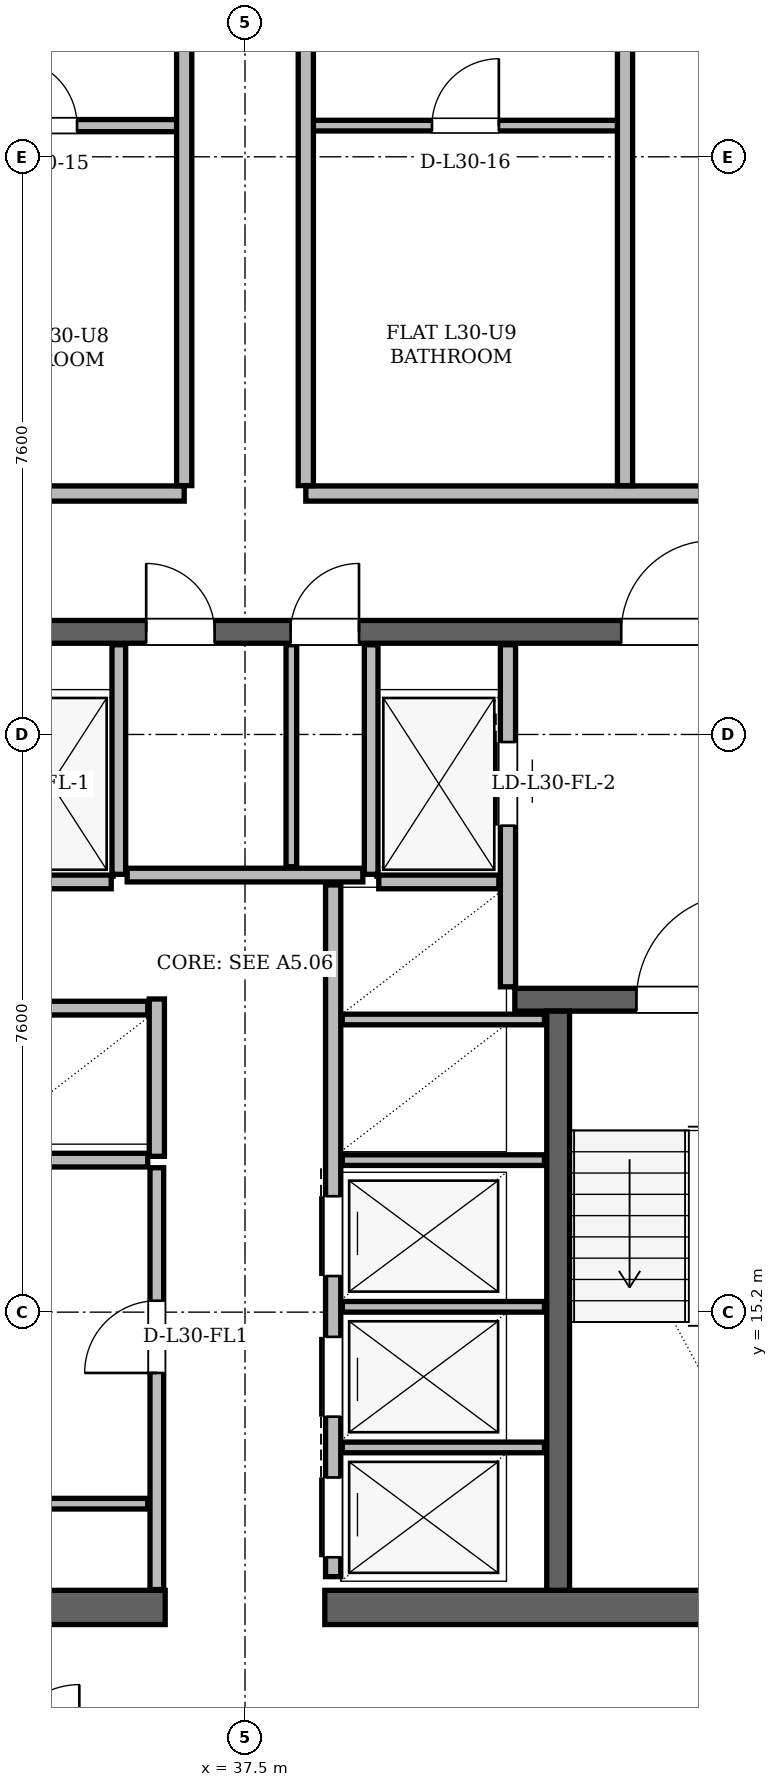
"""IFC4 building model, lengths in metres.
Left out: names, types, materials, properties, quantities, classifications, styles, units other than length and angle.
Written with IfcOpenShell. Run it as: python <this file> out.ifc"""

import sys

from ifc_helpers import new_model, si_unit, direction, frame, frame_2d, origin, place, context, subcontext, project, spatial, rectangle, extrude, element, fill, save


model = new_model("IFC4")
c1 = context("Model", 3, precision=1e-05, world=origin(), true_north=direction((0.0, 1.0)))
c2 = subcontext(c1, "Body", "Model", "MODEL_VIEW")
j1 = project(units=[si_unit("LENGTHUNIT", "METRE"), si_unit("PLANEANGLEUNIT", "RADIAN")], contexts=[c1])
p1 = place(None, origin())
s1 = spatial("IfcSite", under=j1, at=p1, CompositionType="ELEMENT")
p2 = place(p1, origin())
s2 = spatial("IfcBuilding", under=s1, at=p2, CompositionType="ELEMENT")
p3 = place(p2, frame((0.0, 0.0, 115.8)))
s3 = spatial("IfcBuildingStorey", under=s2, at=p3, CompositionType="ELEMENT", Elevation=115.8)
for number, where, z_axis, x_axis in (
    (1, (29.35, 11.315, 0.0), (0.0, 0.0, 1.0), (1.0, 0.0, 0.0)),
    (2, (38.55, 11.315, 0.0), (0.0, 0.0, 1.0), (1.0, 0.0, 0.0)),
):
    element("IfcWall", number, at=place(p3, frame(where, z_axis=z_axis, x_axis=x_axis)), inside=s3, PredefinedType="SHEAR", context=c2, shape_type="SweptSolid", body=[
        extrude(rectangle(XDim=7.1, YDim=0.45, at=frame_2d((3.55, 0.0))), origin(), (0.0, 0.0, 1.0), 3.36),
    ])
p4 = place(p3, frame((29.65, 24.15, 0.0), z_axis=(0.0, 0.0, 1.0), x_axis=(1.0, 0.0, 0.0)))
e3 = element("IfcWall", 3, at=p4, inside=s3, PredefinedType="SHEAR", context=c2, shape_type="SweptSolid", body=[
    extrude(rectangle(XDim=15.7, YDim=0.3, at=frame_2d((7.85, 0.0))), origin(), (0.0, 0.0, 1.0), 3.36),
])
p5 = place(p4, frame((1.7, 0.0, 0.0)))
e4 = element("IfcOpeningElement", 4, at=p5, cuts=e3, PredefinedType="OPENING", context=c2, shape_type="SweptSolid", body=[
    extrude(rectangle(XDim=1.2, YDim=2.2, at=frame_2d((0.6, 1.1))), frame((0.0, 0.15, 0.0), z_axis=(0.0, -1.0, 0.0), x_axis=(1.0, 0.0, 0.0)), (0.0, 0.0, 1.0), 0.3),
])
p6 = place(p4, frame((12.8, 0.0, 0.0)))
e5 = element("IfcOpeningElement", 5, at=p6, cuts=e3, PredefinedType="OPENING", context=c2, shape_type="SweptSolid", body=[
    extrude(rectangle(XDim=1.2, YDim=2.2, at=frame_2d((0.6, 1.1))), frame((0.0, 0.15, 0.0), z_axis=(0.0, -1.0, 0.0), x_axis=(1.0, 0.0, 0.0)), (0.0, 0.0, 1.0), 0.3),
])
p7 = place(p4, frame((6.55, 0.0, 0.0)))
e6 = element("IfcOpeningElement", 6, at=p7, cuts=e3, PredefinedType="OPENING", context=c2, shape_type="SweptSolid", body=[
    extrude(rectangle(XDim=0.9, YDim=2.05, at=frame_2d((0.45, 1.025))), frame((0.0, 0.15, 0.0), z_axis=(0.0, -1.0, 0.0), x_axis=(1.0, 0.0, 0.0)), (0.0, 0.0, 1.0), 0.3),
])
p8 = place(p4, frame((8.45, 0.0, 0.0)))
e7 = element("IfcOpeningElement", 7, at=p8, cuts=e3, PredefinedType="OPENING", context=c2, shape_type="SweptSolid", body=[
    extrude(rectangle(XDim=0.9, YDim=2.05, at=frame_2d((0.45, 1.025))), frame((0.0, 0.15, 0.0), z_axis=(0.0, -1.0, 0.0), x_axis=(1.0, 0.0, 0.0)), (0.0, 0.0, 1.0), 0.3),
])
p9 = place(p3, frame((41.05, 19.31, 0.0), z_axis=(0.0, 0.0, 1.0), x_axis=(1.0, 0.0, 0.0)))
e8 = element("IfcWall", 8, at=p9, inside=s3, PredefinedType="SHEAR", context=c2, shape_type="SweptSolid", body=[
    extrude(rectangle(XDim=4.01, YDim=0.3, at=frame_2d((2.005, 0.0))), origin(), (0.0, 0.0, 1.0), 3.36),
])
p10 = place(p9, frame((1.6, 0.0, 0.0)))
e9 = element("IfcOpeningElement", 9, at=p10, cuts=e8, PredefinedType="OPENING", context=c2, shape_type="SweptSolid", body=[
    extrude(rectangle(XDim=1.4, YDim=2.2, at=frame_2d((0.7, 1.1))), frame((0.0, 0.15, 0.0), z_axis=(0.0, -1.0, 0.0), x_axis=(1.0, 0.0, 0.0)), (0.0, 0.0, 1.0), 0.3),
])
p11 = place(p3, frame((41.62, 11.54, 0.0), z_axis=(0.0, 0.0, 1.0), x_axis=(0.0, 1.0, 0.0)))
e10 = element("IfcWall", 10, at=p11, inside=s3, PredefinedType="SHEAR", context=c2, shape_type="SweptSolid", body=[
    extrude(rectangle(XDim=7.62, YDim=0.3, at=frame_2d((3.81, 0.0))), origin(), (0.0, 0.0, 1.0), 3.36),
])
p12 = place(p3, frame((50.789, 30.024, 0.0), z_axis=(0.0, 0.0, 1.0), x_axis=(-0.499997162583, 0.866027041962, 0.0)))
e11 = element("IfcWall", 11, at=p12, inside=s3, PredefinedType="SOLIDWALL", context=c2, shape_type="SweptSolid", body=[
    extrude(rectangle(XDim=15.463, YDim=0.34, at=frame_2d((7.731, 0.0))), origin(), (0.0, 0.0, 1.0), 2.578),
])
p13 = place(p12, frame((10.744, 0.0, 0.0)))
e12 = element("IfcOpeningElement", 12, at=p13, cuts=e11, PredefinedType="OPENING", context=c2, shape_type="SweptSolid", body=[
    extrude(rectangle(XDim=1.5, YDim=2.2, at=frame_2d((0.75, 1.1))), frame((0.0, 0.17, 0.0), z_axis=(0.0, -1.0, 0.0), x_axis=(1.0, 0.0, 0.0)), (0.0, 0.0, 1.0), 0.34),
])
p14 = place(p12, frame((1.306, 0.0, 0.85)))
e13 = element("IfcOpeningElement", 13, at=p14, cuts=e11, PredefinedType="OPENING", context=c2, shape_type="SweptSolid", body=[
    extrude(rectangle(XDim=2.5, YDim=1.618, at=frame_2d((1.25, 0.809))), frame((0.0, 0.17, 0.0), z_axis=(0.0, -1.0, 0.0), x_axis=(1.0, 0.0, 0.0)), (0.0, 0.0, 1.0), 0.34),
])
p15 = place(p12, frame((5.665, 0.0, 0.85)))
e14 = element("IfcOpeningElement", 14, at=p15, cuts=e11, PredefinedType="OPENING", context=c2, shape_type="SweptSolid", body=[
    extrude(rectangle(XDim=1.2, YDim=1.48, at=frame_2d((0.6, 0.74))), frame((0.0, 0.17, 0.0), z_axis=(0.0, -1.0, 0.0), x_axis=(1.0, 0.0, 0.0)), (0.0, 0.0, 1.0), 0.34),
])
p16 = place(p12, frame((13.231, 0.0, 0.85)))
e15 = element("IfcOpeningElement", 15, at=p16, cuts=e11, PredefinedType="OPENING", context=c2, shape_type="SweptSolid", body=[
    extrude(rectangle(XDim=1.2, YDim=1.48, at=frame_2d((0.6, 0.74))), frame((0.0, 0.17, 0.0), z_axis=(0.0, -1.0, 0.0), x_axis=(1.0, 0.0, 0.0)), (0.0, 0.0, 1.0), 0.34),
])
p17 = place(p3, frame((35.84, 20.96, 0.0), z_axis=(0.0, 0.0, 1.0), x_axis=(0.0, 1.0, 0.0)))
e16 = element("IfcWall", 16, at=p17, inside=s3, PredefinedType="PARTITIONING", context=c2, shape_type="SweptSolid", body=[
    extrude(rectangle(XDim=3.02, YDim=0.18, at=frame_2d((1.51, 0.0))), origin(), (0.0, 0.0, 1.0), 2.4),
])
p18 = place(p3, frame((34.16, 20.86, 0.0), z_axis=(0.0, 0.0, 1.0), x_axis=(1.0, 0.0, 0.0)))
e17 = element("IfcWall", 17, at=p18, inside=s3, PredefinedType="PARTITIONING", context=c2, shape_type="SweptSolid", body=[
    extrude(rectangle(XDim=1.58, YDim=0.18, at=frame_2d((0.79, 0.0))), origin(), (0.0, 0.0, 1.0), 3.36),
])
p19 = place(p3, frame((40.96, 19.48, 0.0), z_axis=(0.0, 0.0, 1.0), x_axis=(0.0, 1.0, 0.0)))
e18 = element("IfcWall", 18, at=p19, inside=s3, PredefinedType="PARTITIONING", context=c2, shape_type="SweptSolid", body=[
    extrude(rectangle(XDim=4.5, YDim=0.2, at=frame_2d((2.25, 0.0))), origin(), (0.0, 0.0, 1.0), 2.4),
])
p20 = place(p19, frame((2.12, 0.0, 0.0)))
e19 = element("IfcOpeningElement", 19, at=p20, cuts=e18, PredefinedType="OPENING", context=c2, shape_type="SweptSolid", body=[
    extrude(rectangle(XDim=1.1, YDim=2.2, at=frame_2d((0.55, 1.1))), frame((0.0, 0.1, 0.0), z_axis=(0.0, -1.0, 0.0), x_axis=(1.0, 0.0, 0.0)), (0.0, 0.0, 1.0), 0.2),
])
p21 = place(p3, frame((39.16, 20.96, 0.0), z_axis=(0.0, 0.0, 1.0), x_axis=(0.0, 1.0, 0.0)))
e20 = element("IfcWall", 20, at=p21, inside=s3, PredefinedType="PARTITIONING", context=c2, shape_type="SweptSolid", body=[
    extrude(rectangle(XDim=3.02, YDim=0.18, at=frame_2d((1.51, 0.0))), origin(), (0.0, 0.0, 1.0), 2.4),
])
p22 = place(p3, frame((39.26, 20.86, 0.0), z_axis=(0.0, 0.0, 1.0), x_axis=(1.0, 0.0, 0.0)))
e21 = element("IfcWall", 21, at=p22, inside=s3, PredefinedType="PARTITIONING", context=c2, shape_type="SweptSolid", body=[
    extrude(rectangle(XDim=1.58, YDim=0.18, at=frame_2d((0.79, 0.0))), origin(), (0.0, 0.0, 1.0), 3.36),
])
p23 = place(p3, frame((36.34, 17.25, 0.0), z_axis=(0.0, 0.0, 1.0), x_axis=(0.0, 1.0, 0.0)))
e22 = element("IfcWall", 22, at=p23, inside=s3, PredefinedType="PARTITIONING", context=c2, shape_type="SweptSolid", body=[
    extrude(rectangle(XDim=2.07, YDim=0.2, at=frame_2d((1.035, 0.0))), origin(), (0.0, 0.0, 1.0), 3.36),
])
p24 = place(p3, frame((33.95, 19.2, 0.0), z_axis=(0.0, 0.0, 1.0), x_axis=(1.0, 0.0, 0.0)))
e23 = element("IfcWall", 23, at=p24, inside=s3, PredefinedType="PARTITIONING", context=c2, shape_type="SweptSolid", body=[
    extrude(rectangle(XDim=2.27, YDim=0.18, at=frame_2d((1.135, 0.0))), origin(), (0.0, 0.0, 1.0), 3.36),
])
p25 = place(p3, frame((33.56, 17.2, 0.0), z_axis=(0.0, 0.0, 1.0), x_axis=(1.0, 0.0, 0.0)))
e24 = element("IfcWall", 24, at=p25, inside=s3, PredefinedType="PARTITIONING", context=c2, shape_type="SweptSolid", body=[
    extrude(rectangle(XDim=2.66, YDim=0.18, at=frame_2d((1.33, 0.0))), origin(), (0.0, 0.0, 1.0), 3.36),
])
p26 = place(p3, frame((36.34, 11.55, 0.0), z_axis=(0.0, 0.0, 1.0), x_axis=(0.0, 1.0, 0.0)))
e25 = element("IfcWall", 25, at=p26, inside=s3, PredefinedType="PARTITIONING", context=c2, shape_type="SweptSolid", body=[
    extrude(rectangle(XDim=5.55, YDim=0.18, at=frame_2d((2.775, 0.0))), origin(), (0.0, 0.0, 1.0), 3.36),
])
p27 = place(p26, frame((2.85, 0.0, 0.0)))
e26 = element("IfcOpeningElement", 26, at=p27, cuts=e25, PredefinedType="OPENING", context=c2, shape_type="SweptSolid", body=[
    extrude(rectangle(XDim=0.95, YDim=2.1, at=frame_2d((0.475, 1.05))), frame((0.0, 0.09, 0.0), z_axis=(0.0, -1.0, 0.0), x_axis=(1.0, 0.0, 0.0)), (0.0, 0.0, 1.0), 0.18),
])
p28 = place(p3, frame((33.56, 12.68, 0.0), z_axis=(0.0, 0.0, 1.0), x_axis=(1.0, 0.0, 0.0)))
e27 = element("IfcWall", 27, at=p28, inside=s3, PredefinedType="PARTITIONING", context=c2, shape_type="SweptSolid", body=[
    extrude(rectangle(XDim=2.66, YDim=0.14, at=frame_2d((1.33, 0.0))), origin(), (0.0, 0.0, 1.0), 3.36),
])
p29 = place(p3, frame((38.66, 11.72, 0.0), z_axis=(0.0, 0.0, 1.0), x_axis=(0.0, 1.0, 0.0)))
e28 = element("IfcWall", 28, at=p29, inside=s3, PredefinedType="PARTITIONING", context=c2, shape_type="SweptSolid", body=[
    extrude(rectangle(XDim=9.1, YDim=0.2, at=frame_2d((4.55, 0.0))), origin(), (0.0, 0.0, 1.0), 3.36),
])
p30 = place(p29, frame((0.255, 0.0, 0.0)))
e29 = element("IfcOpeningElement", 29, at=p30, cuts=e28, PredefinedType="OPENING", context=c2, shape_type="SweptSolid", body=[
    extrude(rectangle(XDim=1.05, YDim=2.15, at=frame_2d((0.525, 1.075))), frame((0.0, 0.1, 0.0), z_axis=(0.0, -1.0, 0.0), x_axis=(1.0, 0.0, 0.0)), (0.0, 0.0, 1.0), 0.2),
])
p31 = place(p29, frame((2.105, 0.0, 0.0)))
e30 = element("IfcOpeningElement", 30, at=p31, cuts=e28, PredefinedType="OPENING", context=c2, shape_type="SweptSolid", body=[
    extrude(rectangle(XDim=1.05, YDim=2.15, at=frame_2d((0.525, 1.075))), frame((0.0, 0.1, 0.0), z_axis=(0.0, -1.0, 0.0), x_axis=(1.0, 0.0, 0.0)), (0.0, 0.0, 1.0), 0.2),
])
p32 = place(p29, frame((3.955, 0.0, 0.0)))
e31 = element("IfcOpeningElement", 31, at=p32, cuts=e28, PredefinedType="OPENING", context=c2, shape_type="SweptSolid", body=[
    extrude(rectangle(XDim=1.05, YDim=2.15, at=frame_2d((0.525, 1.075))), frame((0.0, 0.1, 0.0), z_axis=(0.0, -1.0, 0.0), x_axis=(1.0, 0.0, 0.0)), (0.0, 0.0, 1.0), 0.2),
])
for number, where, z_axis, x_axis in (
    (32, (38.78, 13.42, 0.0), (0.0, 0.0, 1.0), (1.0, 0.0, 0.0)),
    (33, (38.78, 15.27, 0.0), (0.0, 0.0, 1.0), (1.0, 0.0, 0.0)),
    (34, (38.78, 17.2, 0.0), (0.0, 0.0, 1.0), (1.0, 0.0, 0.0)),
    (35, (38.78, 19.05, 0.0), (0.0, 0.0, 1.0), (1.0, 0.0, 0.0)),
):
    element("IfcWall", number, at=place(p3, frame(where, z_axis=z_axis, x_axis=x_axis)), inside=s3, PredefinedType="PARTITIONING", context=c2, shape_type="SweptSolid", body=[
        extrude(rectangle(XDim=2.66, YDim=0.14, at=frame_2d((1.33, 0.0))), origin(), (0.0, 0.0, 1.0), 3.36),
    ])
p33 = place(p3, frame((35.95, 20.95, 0.0), z_axis=(0.0, 0.0, 1.0), x_axis=(1.0, 0.0, 0.0)))
e36 = element("IfcWall", 36, at=p33, inside=s3, PredefinedType="PARTITIONING", context=c2, shape_type="SweptSolid", body=[
    extrude(rectangle(XDim=3.1, YDim=0.18, at=frame_2d((1.55, 0.0))), origin(), (0.0, 0.0, 1.0), 3.36),
])
p34 = place(p3, frame((38.11, 21.06, 0.0), z_axis=(0.0, 0.0, 1.0), x_axis=(0.0, 1.0, 0.0)))
e37 = element("IfcWall", 37, at=p34, inside=s3, PredefinedType="PARTITIONING", context=c2, shape_type="SweptSolid", body=[
    extrude(rectangle(XDim=2.92, YDim=0.14, at=frame_2d((1.46, 0.0))), origin(), (0.0, 0.0, 1.0), 2.4),
])
p35 = place(p3, frame((27.55, 25.97, 0.0), z_axis=(0.0, 0.0, 1.0), x_axis=(1.0, 0.0, 0.0)))
e38 = element("IfcWall", 38, at=p35, inside=s3, PredefinedType="PARTITIONING", context=c2, shape_type="SweptSolid", body=[
    extrude(rectangle(XDim=9.15, YDim=0.2, at=frame_2d((4.575, 0.0))), origin(), (0.0, 0.0, 1.0), 2.814),
])
p36 = place(p35, frame((2.173, 0.0, 0.0)))
e39 = element("IfcOpeningElement", 39, at=p36, cuts=e38, PredefinedType="OPENING", context=c2, shape_type="SweptSolid", body=[
    extrude(rectangle(XDim=1.0, YDim=2.18, at=frame_2d((0.5, 1.09))), frame((0.0, 0.1, 0.0), z_axis=(0.0, -1.0, 0.0), x_axis=(1.0, 0.0, 0.0)), (0.0, 0.0, 1.0), 0.2),
])
p37 = place(p3, frame((38.3, 25.97, 0.0), z_axis=(0.0, 0.0, 1.0), x_axis=(1.0, 0.0, 0.0)))
e40 = element("IfcWall", 40, at=p37, inside=s3, PredefinedType="PARTITIONING", context=c2, shape_type="SweptSolid", body=[
    extrude(rectangle(XDim=11.7, YDim=0.2, at=frame_2d((5.85, 0.0))), origin(), (0.0, 0.0, 1.0), 2.814),
])
p38 = place(p37, frame((7.727, 0.0, 0.0)))
e41 = element("IfcOpeningElement", 41, at=p38, cuts=e40, PredefinedType="OPENING", context=c2, shape_type="SweptSolid", body=[
    extrude(rectangle(XDim=1.0, YDim=2.18, at=frame_2d((0.5, 1.09))), frame((0.0, 0.1, 0.0), z_axis=(0.0, -1.0, 0.0), x_axis=(1.0, 0.0, 0.0)), (0.0, 0.0, 1.0), 0.2),
])
p39 = place(p3, frame((32.918, 30.81, 0.0), z_axis=(0.0, 0.0, 1.0), x_axis=(1.0, 0.0, 0.0)))
e42 = element("IfcWall", 42, at=p39, inside=s3, PredefinedType="PARTITIONING", context=c2, shape_type="SweptSolid", body=[
    extrude(rectangle(XDim=3.864, YDim=0.16, at=frame_2d((1.932, 0.0))), origin(), (0.0, 0.0, 1.0), 3.36),
])
p40 = place(p39, frame((1.492, 0.0, 0.0)))
e43 = element("IfcOpeningElement", 43, at=p40, cuts=e42, PredefinedType="OPENING", context=c2, shape_type="SweptSolid", body=[
    extrude(rectangle(XDim=0.88, YDim=2.08, at=frame_2d((0.44, 1.04))), frame((0.0, 0.08, 0.0), z_axis=(0.0, -1.0, 0.0), x_axis=(1.0, 0.0, 0.0)), (0.0, 0.0, 1.0), 0.16),
])
p41 = place(p3, frame((38.218, 30.81, 0.0), z_axis=(0.0, 0.0, 1.0), x_axis=(1.0, 0.0, 0.0)))
e44 = element("IfcWall", 44, at=p41, inside=s3, PredefinedType="PARTITIONING", context=c2, shape_type="SweptSolid", body=[
    extrude(rectangle(XDim=4.364, YDim=0.14, at=frame_2d((2.182, 0.0))), origin(), (0.0, 0.0, 1.0), 3.36),
])
p42 = place(p41, frame((1.742, 0.0, 0.0)))
e45 = element("IfcOpeningElement", 45, at=p42, cuts=e44, PredefinedType="OPENING", context=c2, shape_type="SweptSolid", body=[
    extrude(rectangle(XDim=0.88, YDim=2.08, at=frame_2d((0.44, 1.04))), frame((0.0, 0.07, 0.0), z_axis=(0.0, -1.0, 0.0), x_axis=(1.0, 0.0, 0.0)), (0.0, 0.0, 1.0), 0.14),
])
p43 = place(p3, frame((36.7, 26.074, 0.0), z_axis=(0.0, 0.0, 1.0), x_axis=(0.0, 1.0, 0.0)))
e46 = element("IfcWall", 46, at=p43, inside=s3, PredefinedType="PARTITIONING", context=c2, shape_type="SweptSolid", body=[
    extrude(rectangle(XDim=17.168, YDim=0.2, at=frame_2d((8.584, 0.0))), origin(), (0.0, 0.0, 1.0), 3.36),
])
p44 = place(p43, frame((8.537, 0.0, 0.0)))
e47 = element("IfcOpeningElement", 47, at=p44, cuts=e46, PredefinedType="OPENING", context=c2, shape_type="SweptSolid", body=[
    extrude(rectangle(XDim=1.0, YDim=2.18, at=frame_2d((0.5, 1.09))), frame((0.0, 0.1, 0.0), z_axis=(0.0, -1.0, 0.0), x_axis=(1.0, 0.0, 0.0)), (0.0, 0.0, 1.0), 0.2),
])
p45 = place(p3, frame((38.3, 26.074, 0.0), z_axis=(0.0, 0.0, 1.0), x_axis=(0.0, 1.0, 0.0)))
e48 = element("IfcWall", 48, at=p45, inside=s3, PredefinedType="PARTITIONING", context=c2, shape_type="SweptSolid", body=[
    extrude(rectangle(XDim=13.422, YDim=0.2, at=frame_2d((6.711, 0.0))), origin(), (0.0, 0.0, 1.0), 3.36),
])
p46 = place(p45, frame((8.537, 0.0, 0.0)))
e49 = element("IfcOpeningElement", 49, at=p46, cuts=e48, PredefinedType="OPENING", context=c2, shape_type="SweptSolid", body=[
    extrude(rectangle(XDim=1.0, YDim=2.18, at=frame_2d((0.5, 1.09))), frame((0.0, 0.1, 0.0), z_axis=(0.0, -1.0, 0.0), x_axis=(1.0, 0.0, 0.0)), (0.0, 0.0, 1.0), 0.2),
])
p47 = place(p3, frame((42.5, 26.074, 0.0), z_axis=(0.0, 0.0, 1.0), x_axis=(0.0, 1.0, 0.0)))
e50 = element("IfcWall", 50, at=p47, inside=s3, PredefinedType="PARTITIONING", context=c2, shape_type="SweptSolid", body=[
    extrude(rectangle(XDim=17.168, YDim=0.2, at=frame_2d((8.584, 0.0))), origin(), (0.0, 0.0, 1.0), 3.36),
])
p48 = place(p27, origin())
e51 = element("IfcDoor", 51, at=p48, inside=s3, OperationType="SINGLE_SWING_LEFT", PredefinedType="DOOR", context=c2, shape_type="SweptSolid", body=[
    extrude(rectangle(XDim=0.95, YDim=2.1, at=frame_2d((0.475, 1.05))), frame((0.0, 0.025, 0.0), z_axis=(0.0, -1.0, 0.0), x_axis=(1.0, 0.0, 0.0)), (0.0, 0.0, 1.0), 0.05),
])
fill(e26, e51)
p49 = place(p20, origin())
e52 = element("IfcDoor", 52, at=p49, inside=s3, OperationType="SLIDING_TO_RIGHT", PredefinedType="DOOR", context=c2, shape_type="SweptSolid", body=[
    extrude(rectangle(XDim=1.1, YDim=2.2, at=frame_2d((0.55, 1.1))), frame((0.0, 0.025, 0.0), z_axis=(0.0, -1.0, 0.0), x_axis=(1.0, 0.0, 0.0)), (0.0, 0.0, 1.0), 0.05),
])
fill(e19, e52)
p50 = place(p30, origin())
e53 = element("IfcDoor", 53, at=p50, inside=s3, OperationType="SLIDING_TO_RIGHT", PredefinedType="DOOR", context=c2, shape_type="SweptSolid", body=[
    extrude(rectangle(XDim=1.05, YDim=2.15, at=frame_2d((0.525, 1.075))), frame((0.0, 0.025, 0.0), z_axis=(0.0, -1.0, 0.0), x_axis=(1.0, 0.0, 0.0)), (0.0, 0.0, 1.0), 0.05),
])
fill(e29, e53)
p51 = place(p31, origin())
e54 = element("IfcDoor", 54, at=p51, inside=s3, OperationType="SLIDING_TO_LEFT", PredefinedType="DOOR", context=c2, shape_type="SweptSolid", body=[
    extrude(rectangle(XDim=1.05, YDim=2.15, at=frame_2d((0.525, 1.075))), frame((0.0, 0.025, 0.0), z_axis=(0.0, -1.0, 0.0), x_axis=(1.0, 0.0, 0.0)), (0.0, 0.0, 1.0), 0.05),
])
fill(e30, e54)
p52 = place(p32, origin())
e55 = element("IfcDoor", 55, at=p52, inside=s3, OperationType="SLIDING_TO_RIGHT", PredefinedType="DOOR", context=c2, shape_type="SweptSolid", body=[
    extrude(rectangle(XDim=1.05, YDim=2.15, at=frame_2d((0.525, 1.075))), frame((0.0, 0.025, 0.0), z_axis=(0.0, -1.0, 0.0), x_axis=(1.0, 0.0, 0.0)), (0.0, 0.0, 1.0), 0.05),
])
fill(e31, e55)
p53 = place(p10, origin())
e56 = element("IfcDoor", 56, at=p53, inside=s3, OperationType="SINGLE_SWING_RIGHT", PredefinedType="DOOR", context=c2, shape_type="SweptSolid", body=[
    extrude(rectangle(XDim=1.4, YDim=2.2, at=frame_2d((0.7, 1.1))), frame((0.0, 0.025, 0.0), z_axis=(0.0, -1.0, 0.0), x_axis=(1.0, 0.0, 0.0)), (0.0, 0.0, 1.0), 0.05),
])
fill(e9, e56)
p54 = place(p6, origin())
e57 = element("IfcDoor", 57, at=p54, inside=s3, OperationType="SINGLE_SWING_RIGHT", PredefinedType="DOOR", context=c2, shape_type="SweptSolid", body=[
    extrude(rectangle(XDim=1.2, YDim=2.2, at=frame_2d((0.6, 1.1))), frame((0.0, 0.025, 0.0), z_axis=(0.0, -1.0, 0.0), x_axis=(1.0, 0.0, 0.0)), (0.0, 0.0, 1.0), 0.05),
])
fill(e5, e57)
p55 = place(p7, origin())
e58 = element("IfcDoor", 58, at=p55, inside=s3, OperationType="SINGLE_SWING_LEFT", PredefinedType="DOOR", context=c2, shape_type="SweptSolid", body=[
    extrude(rectangle(XDim=0.9, YDim=2.05, at=frame_2d((0.45, 1.025))), frame((0.0, 0.025, 0.0), z_axis=(0.0, -1.0, 0.0), x_axis=(1.0, 0.0, 0.0)), (0.0, 0.0, 1.0), 0.05),
])
fill(e6, e58)
p56 = place(p8, origin())
e59 = element("IfcDoor", 59, at=p56, inside=s3, OperationType="SINGLE_SWING_RIGHT", PredefinedType="DOOR", context=c2, shape_type="SweptSolid", body=[
    extrude(rectangle(XDim=0.9, YDim=2.05, at=frame_2d((0.45, 1.025))), frame((0.0, 0.025, 0.0), z_axis=(0.0, -1.0, 0.0), x_axis=(1.0, 0.0, 0.0)), (0.0, 0.0, 1.0), 0.05),
])
fill(e7, e59)
p57 = place(p40, origin())
e60 = element("IfcDoor", 60, at=p57, inside=s3, OperationType="SINGLE_SWING_LEFT", PredefinedType="DOOR", context=c2, shape_type="SweptSolid", body=[
    extrude(rectangle(XDim=0.88, YDim=2.08, at=frame_2d((0.44, 1.04))), frame((0.0, 0.025, 0.0), z_axis=(0.0, -1.0, 0.0), x_axis=(1.0, 0.0, 0.0)), (0.0, 0.0, 1.0), 0.05),
])
fill(e43, e60)
p58 = place(p42, origin())
e61 = element("IfcDoor", 61, at=p58, inside=s3, OperationType="SINGLE_SWING_RIGHT", PredefinedType="DOOR", context=c2, shape_type="SweptSolid", body=[
    extrude(rectangle(XDim=0.88, YDim=2.08, at=frame_2d((0.44, 1.04))), frame((0.0, 0.025, 0.0), z_axis=(0.0, -1.0, 0.0), x_axis=(1.0, 0.0, 0.0)), (0.0, 0.0, 1.0), 0.05),
])
fill(e45, e61)
save(model, sys.argv[1])
